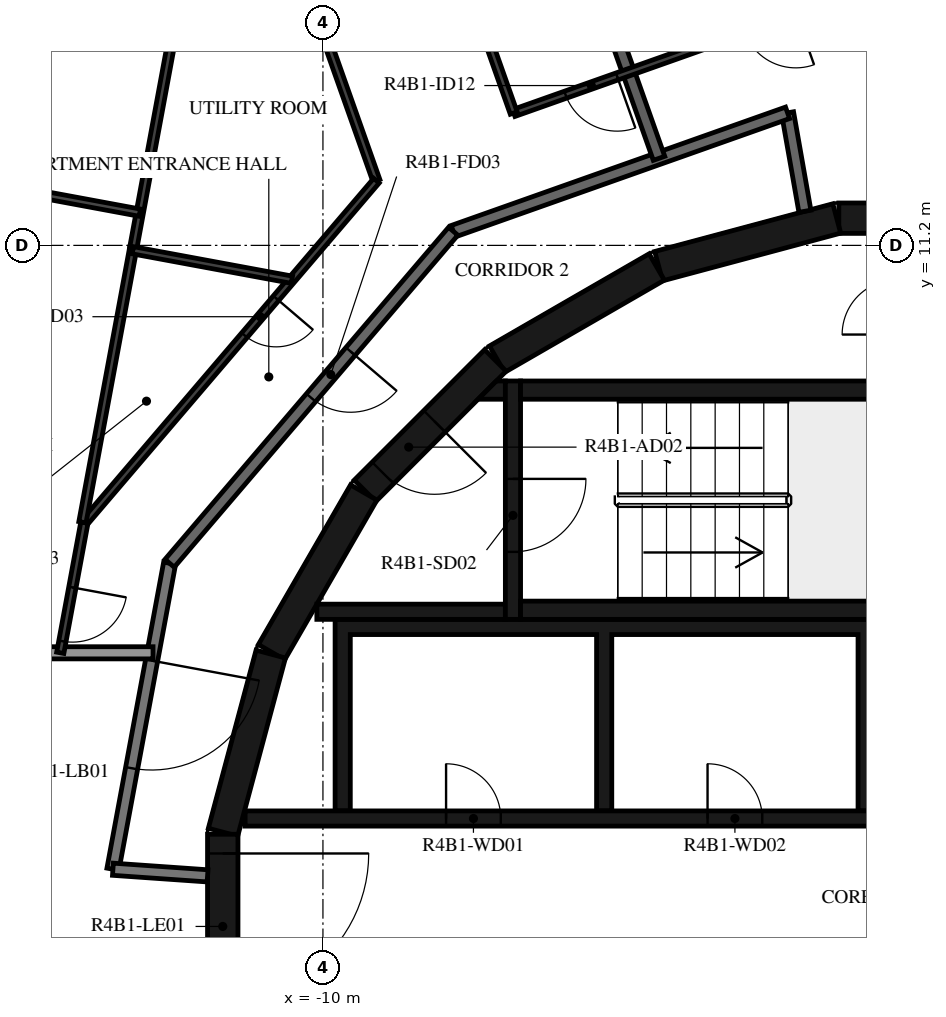
"""IFC4 building model, lengths in metres.
Left out: names, types, materials, properties, quantities, classifications, styles, units other than length and angle.
Written with IfcOpenShell. Run it as: python <this file> out.ifc"""

import sys

from ifc_helpers import new_model, si_unit, direction, frame, frame_2d, origin, place, context, subcontext, project, spatial, polyline, rectangle, outline, extrude, element, fill, save


model = new_model("IFC4")
c1 = context("Model", 3, precision=1e-05, world=origin(), true_north=direction((0.0, 1.0)))
c2 = subcontext(c1, "Body", "Model", "MODEL_VIEW")
j1 = project(units=[si_unit("LENGTHUNIT", "METRE"), si_unit("PLANEANGLEUNIT", "RADIAN")], contexts=[c1])
p1 = place(None, origin())
s1 = spatial("IfcSite", under=j1, at=p1, CompositionType="ELEMENT")
p2 = place(p1, origin())
s2 = spatial("IfcBuilding", under=s1, at=p2, CompositionType="ELEMENT")
p3 = place(p2, frame((0.0, 0.0, 162.2)))
s3 = spatial("IfcBuildingStorey", under=s2, at=p3, CompositionType="ELEMENT", Elevation=162.2)
for number, where, z_axis, x_axis in (
    (1, (1.516, 11.647, 0.0), (0.0, 0.0, 1.0), (-1.0, 0.0, 0.0)),
    (2, (-1.55, 11.643, 0.0), (0.0, 0.0, 1.0), (-0.966, -0.259, 0.0)),
    (3, (-4.51, 10.845, 0.0), (0.0, 0.0, 1.0), (-0.866, -0.5, 0.0)),
):
    element("IfcWall", number, at=place(p3, frame(where, z_axis=z_axis, x_axis=x_axis)), inside=s3, PredefinedType="SHEAR", context=c2, shape_type="SweptSolid", body=[
        extrude(rectangle(XDim=3.033, YDim=0.5, at=frame_2d((1.516, 0.0))), origin(), (0.0, 0.0, 1.0), 3.12),
    ])
p4 = place(p3, frame((-7.164, 9.308, 0.0), z_axis=(0.0, 0.0, 1.0), x_axis=(-0.707106781187, -0.707106781187, 0.0)))
e4 = element("IfcWall", 4, at=p4, inside=s3, PredefinedType="SHEAR", context=c2, shape_type="SweptSolid", body=[
    extrude(rectangle(XDim=3.032, YDim=0.5, at=frame_2d((1.516, 0.0))), origin(), (0.0, 0.0, 1.0), 3.12),
])
p5 = place(p4, frame((1.416, 0.0, 0.0)))
e5 = element("IfcOpeningElement", 5, at=p5, cuts=e4, PredefinedType="OPENING", context=c2, shape_type="SweptSolid", body=[
    extrude(rectangle(XDim=1.2, YDim=2.1, at=frame_2d((0.6, 1.05))), frame((0.0, 0.26, 0.0), z_axis=(0.0, -1.0, 0.0), x_axis=(1.0, 0.0, 0.0)), (0.0, 0.0, 1.0), 0.52),
])
for number, where, z_axis, x_axis in (
    (6, (-9.329, 7.137, 0.0), (0.0, 0.0, 1.0), (-0.5, -0.866, 0.0)),
    (7, (-10.858, 4.479, 0.0), (0.0, 0.0, 1.0), (-0.259, -0.966, 0.0)),
):
    element("IfcWall", number, at=place(p3, frame(where, z_axis=z_axis, x_axis=x_axis)), inside=s3, PredefinedType="SHEAR", context=c2, shape_type="SweptSolid", body=[
        extrude(rectangle(XDim=3.033, YDim=0.5, at=frame_2d((1.516, 0.0))), origin(), (0.0, 0.0, 1.0), 3.12),
    ])
p6 = place(p3, frame((-11.647, 1.516, 0.0), z_axis=(0.0, 0.0, 1.0), x_axis=(0.0, -1.0, 0.0)))
e8 = element("IfcWall", 8, at=p6, inside=s3, PredefinedType="SHEAR", context=c2, shape_type="SweptSolid", body=[
    extrude(rectangle(XDim=3.033, YDim=0.5, at=frame_2d((1.516, 0.0))), origin(), (0.0, 0.0, 1.0), 3.12),
])
p7 = place(p6, frame((0.316, 0.0, 0.0)))
e9 = element("IfcOpeningElement", 9, at=p7, cuts=e8, PredefinedType="OPENING", context=c2, shape_type="SweptSolid", body=[
    extrude(rectangle(XDim=2.4, YDim=2.1, at=frame_2d((1.2, 1.05))), frame((0.0, 0.26, 0.0), z_axis=(0.0, -1.0, 0.0), x_axis=(1.0, 0.0, 0.0)), (0.0, 0.0, 1.0), 0.52),
])
for number, where, z_axis, x_axis in (
    (10, (-6.75, 5.2, 0.0), (0.0, 0.0, 1.0), (1.0, 0.0, 0.0)),
    (11, (-6.75, 8.82, 0.0), (0.0, 0.0, 1.0), (1.0, 0.0, 0.0)),
):
    element("IfcWall", number, at=place(p3, frame(where, z_axis=z_axis, x_axis=x_axis)), inside=s3, PredefinedType="SHEAR", context=c2, shape_type="SweptSolid", body=[
        extrude(rectangle(XDim=6.75, YDim=0.3, at=frame_2d((3.375, 0.0))), origin(), (0.0, 0.0, 1.0), 3.12),
    ])
p8 = place(p3, frame((-6.875, 8.97, 0.0), z_axis=(0.0, 0.0, 1.0), x_axis=(0.0, -1.0, 0.0)))
e12 = element("IfcWall", 12, at=p8, inside=s3, PredefinedType="SHEAR", context=c2, shape_type="SweptSolid", body=[
    extrude(rectangle(XDim=3.92, YDim=0.25, at=frame_2d((1.96, 0.0))), origin(), (0.0, 0.0, 1.0), 3.12),
])
p9 = place(p8, frame((1.61, 0.0, 0.0)))
e13 = element("IfcOpeningElement", 13, at=p9, cuts=e12, PredefinedType="OPENING", context=c2, shape_type="SweptSolid", body=[
    extrude(rectangle(XDim=1.2, YDim=2.1, at=frame_2d((0.6, 1.05))), frame((0.0, 0.135, 0.0), z_axis=(0.0, -1.0, 0.0), x_axis=(1.0, 0.0, 0.0)), (0.0, 0.0, 1.0), 0.27),
])
p10 = place(p3, frame((-7.0, 5.175, 0.0), z_axis=(0.0, 0.0, 1.0), x_axis=(-1.0, 0.0, 0.0)))
e14 = element("IfcWall", 14, at=p10, inside=s3, PredefinedType="SHEAR", context=c2, shape_type="SweptSolid", body=[
    extrude(rectangle(XDim=3.1, YDim=0.25, at=frame_2d((1.55, 0.0))), origin(), (0.0, 0.0, 1.0), 3.12),
])
p11 = place(p3, origin())
e15 = element("IfcWall", 15, at=p11, inside=s3, PredefinedType="SHEAR", context=c2, shape_type="SweptSolid", body=[
    extrude(outline(polyline([(-7.148, 8.97), (-7.0, 8.97), (-7.0, 8.67), (-7.448, 8.67), (-7.148, 8.97)])), origin(), (0.0, 0.0, 1.0), 3.12),
])
p12 = place(p3, origin())
e16 = element("IfcWall", 16, at=p12, inside=s3, PredefinedType="SHEAR", context=c2, shape_type="SweptSolid", body=[
    extrude(outline(polyline([(-9.55, 4.8), (-5.5, 4.8), (-5.5, 1.9), (-5.25, 1.9), (-5.25, 4.8), (-1.2, 4.8), (-1.2, 1.9), (-0.95, 1.9), (-0.95, 4.8), (0.95, 4.8), (0.95, 1.9), (1.2, 1.9), (1.2, 4.8), (3.1, 4.8), (3.1, 1.9), (3.35, 1.9), (3.35, 4.8), (5.25, 4.8), (5.25, 1.9), (5.5, 1.9), (5.5, 4.8), (7.4, 4.8), (7.4, 1.9), (7.65, 1.9), (7.65, 4.8), (9.55, 4.8), (9.55, 1.9), (9.8, 1.9), (9.8, 4.8), (9.8, 5.05), (-9.8, 5.05), (-9.8, 4.8), (-9.8, 1.9), (-9.55, 1.9), (-9.55, 4.8)])), origin(), (0.0, 0.0, 1.0), 3.12),
])
p13 = place(p3, frame((-11.28, 1.775, 0.0), z_axis=(0.0, 0.0, 1.0), x_axis=(1.0, 0.0, 0.0)))
e17 = element("IfcWall", 17, at=p13, inside=s3, PredefinedType="SHEAR", context=c2, shape_type="SweptSolid", body=[
    extrude(rectangle(XDim=14.38, YDim=0.25, at=frame_2d((7.19, 0.0))), origin(), (0.0, 0.0, 1.0), 3.12),
])
p14 = place(p13, frame((10.73, 0.0, 0.0)))
e18 = element("IfcOpeningElement", 18, at=p14, cuts=e17, PredefinedType="OPENING", context=c2, shape_type="SweptSolid", body=[
    extrude(rectangle(XDim=1.1, YDim=2.1, at=frame_2d((0.55, 1.05))), frame((0.0, 0.135, 0.0), z_axis=(0.0, -1.0, 0.0), x_axis=(1.0, 0.0, 0.0)), (0.0, 0.0, 1.0), 0.27),
])
p15 = place(p13, frame((12.88, 0.0, 0.0)))
e19 = element("IfcOpeningElement", 19, at=p15, cuts=e17, PredefinedType="OPENING", context=c2, shape_type="SweptSolid", body=[
    extrude(rectangle(XDim=1.1, YDim=2.1, at=frame_2d((0.55, 1.05))), frame((0.0, 0.135, 0.0), z_axis=(0.0, -1.0, 0.0), x_axis=(1.0, 0.0, 0.0)), (0.0, 0.0, 1.0), 0.27),
])
p16 = place(p13, frame((3.305, 0.0, 0.0)))
e20 = element("IfcOpeningElement", 20, at=p16, cuts=e17, PredefinedType="OPENING", context=c2, shape_type="SweptSolid", body=[
    extrude(rectangle(XDim=0.9, YDim=2.1, at=frame_2d((0.45, 1.05))), frame((0.0, 0.135, 0.0), z_axis=(0.0, -1.0, 0.0), x_axis=(1.0, 0.0, 0.0)), (0.0, 0.0, 1.0), 0.27),
])
p17 = place(p13, frame((7.605, 0.0, 0.0)))
e21 = element("IfcOpeningElement", 21, at=p17, cuts=e17, PredefinedType="OPENING", context=c2, shape_type="SweptSolid", body=[
    extrude(rectangle(XDim=0.9, YDim=2.1, at=frame_2d((0.45, 1.05))), frame((0.0, 0.135, 0.0), z_axis=(0.0, -1.0, 0.0), x_axis=(1.0, 0.0, 0.0)), (0.0, 0.0, 1.0), 0.27),
])
p18 = place(p3, frame((-12.521, 5.972, 0.0), z_axis=(0.0, 0.0, 1.0), x_axis=(-0.182251559718, -0.983251935661, 0.0)))
e22 = element("IfcWall", 22, at=p18, inside=s3, PredefinedType="STANDARD", context=c2, shape_type="SweptSolid", body=[
    extrude(rectangle(XDim=5.117, YDim=0.2, at=frame_2d((2.559, 0.0))), origin(), (0.0, 0.0, 1.0), 3.12),
])
p19 = place(p18, frame((1.627, 0.0, 0.0)))
e23 = element("IfcOpeningElement", 23, at=p19, cuts=e22, PredefinedType="OPENING", context=c2, shape_type="SweptSolid", body=[
    extrude(rectangle(XDim=1.8, YDim=2.1, at=frame_2d((0.9, 1.05))), frame((0.0, 0.11, 0.0), z_axis=(0.0, -1.0, 0.0), x_axis=(1.0, 0.0, 0.0)), (0.0, 0.0, 1.0), 0.22),
])
p20 = place(p3, frame((-13.454, 0.941, 0.0), z_axis=(0.0, 0.0, 1.0), x_axis=(0.99755155062, -0.069934997354, 0.0)))
e24 = element("IfcWall", 24, at=p20, inside=s3, PredefinedType="STANDARD", context=c2, shape_type="SweptSolid", body=[
    extrude(rectangle(XDim=1.561, YDim=0.2, at=frame_2d((0.78, 0.0))), origin(), (0.0, 0.0, 1.0), 3.12),
])
p21 = place(p3, frame((-2.074, 11.761, 0.0), z_axis=(0.0, 0.0, 1.0), x_axis=(-0.1736412798, 0.984808969267, 0.0)))
e25 = element("IfcWall", 25, at=p21, inside=s3, PredefinedType="STANDARD", context=c2, shape_type="SweptSolid", body=[
    extrude(rectangle(XDim=1.644, YDim=0.2, at=frame_2d((0.822, 0.0))), origin(), (0.0, 0.0, 1.0), 3.12),
])
p22 = place(p3, frame((-2.359, 13.38, 0.0), z_axis=(0.0, 0.0, 1.0), x_axis=(-0.942647529236, -0.333789807551, 0.0)))
e26 = element("IfcWall", 26, at=p22, inside=s3, PredefinedType="STANDARD", context=c2, shape_type="SweptSolid", body=[
    extrude(rectangle(XDim=5.833, YDim=0.2, at=frame_2d((2.917, 0.0))), origin(), (0.0, 0.0, 1.0), 3.12),
])
p23 = place(p3, frame((-7.858, 11.433, 0.0), z_axis=(0.0, 0.0, 1.0), x_axis=(-0.649440801937, -0.760412154545, 0.0)))
e27 = element("IfcWall", 27, at=p23, inside=s3, PredefinedType="STANDARD", context=c2, shape_type="SweptSolid", body=[
    extrude(rectangle(XDim=7.181, YDim=0.2, at=frame_2d((3.59, 0.0))), origin(), (0.0, 0.0, 1.0), 3.12),
])
p24 = place(p23, frame((2.6, 0.0, 0.0)))
e28 = element("IfcOpeningElement", 28, at=p24, cuts=e27, PredefinedType="OPENING", context=c2, shape_type="SweptSolid", body=[
    extrude(rectangle(XDim=1.0, YDim=2.1, at=frame_2d((0.5, 1.05))), frame((0.0, 0.11, 0.0), z_axis=(0.0, -1.0, 0.0), x_axis=(1.0, 0.0, 0.0)), (0.0, 0.0, 1.0), 0.22),
])
p25 = place(p3, frame((-12.794, 4.5, 0.0), z_axis=(0.0, 0.0, 1.0), x_axis=(-1.0, 0.0, 0.0)))
e29 = element("IfcWall", 29, at=p25, inside=s3, PredefinedType="STANDARD", context=c2, shape_type="SweptSolid", body=[
    extrude(rectangle(XDim=5.106, YDim=0.2, at=frame_2d((2.553, 0.0))), origin(), (0.0, 0.0, 1.0), 2.73),
])
p26 = place(p3, frame((-5.887, 16.626, 0.0), z_axis=(0.0, 0.0, 1.0), x_axis=(0.333820478853, -0.942636668021, 0.0)))
e30 = element("IfcWall", 30, at=p26, inside=s3, PredefinedType="STANDARD", context=c2, shape_type="SweptSolid", body=[
    extrude(rectangle(XDim=4.238, YDim=0.2, at=frame_2d((2.119, 0.0))), origin(), (0.0, 0.0, 1.0), 3.12),
])
p27 = place(p3, frame((6.081, 14.027, 0.0), z_axis=(0.0, 0.0, 1.0), x_axis=(-0.983250989832, 0.182256662416, 0.0)))
e31 = element("IfcWall", 31, at=p27, inside=s3, PredefinedType="PARTITIONING", context=c2, shape_type="SweptSolid", body=[
    extrude(rectangle(XDim=7.416, YDim=0.12, at=frame_2d((3.708, 0.0))), origin(), (0.0, 0.0, 1.0), 3.12),
])
p28 = place(p27, frame((0.2, 0.0, 0.0)))
e32 = element("IfcOpeningElement", 32, at=p28, cuts=e31, PredefinedType="OPENING", context=c2, shape_type="SweptSolid", body=[
    extrude(rectangle(XDim=0.9, YDim=2.1, at=frame_2d((0.45, 1.05))), frame((0.0, 0.07, 0.0), z_axis=(0.0, -1.0, 0.0), x_axis=(1.0, 0.0, 0.0)), (0.0, 0.0, 1.0), 0.14),
])
p29 = place(p27, frame((4.065, 0.0, 0.0)))
e33 = element("IfcOpeningElement", 33, at=p29, cuts=e31, PredefinedType="OPENING", context=c2, shape_type="SweptSolid", body=[
    extrude(rectangle(XDim=0.8, YDim=2.1, at=frame_2d((0.4, 1.05))), frame((0.0, 0.07, 0.0), z_axis=(0.0, -1.0, 0.0), x_axis=(1.0, 0.0, 0.0)), (0.0, 0.0, 1.0), 0.14),
])
p30 = place(p3, frame((-1.21, 15.378, 0.0), z_axis=(0.0, 0.0, 1.0), x_axis=(-0.9426440416, -0.333799656734, 0.0)))
e34 = element("IfcWall", 34, at=p30, inside=s3, PredefinedType="PARTITIONING", context=c2, shape_type="SweptSolid", body=[
    extrude(rectangle(XDim=5.996, YDim=0.12, at=frame_2d((2.998, 0.0))), origin(), (0.0, 0.0, 1.0), 3.12),
])
p31 = place(p30, frame((1.075, 0.0, 0.0)))
e35 = element("IfcOpeningElement", 35, at=p31, cuts=e34, PredefinedType="OPENING", context=c2, shape_type="SweptSolid", body=[
    extrude(rectangle(XDim=0.9, YDim=2.1, at=frame_2d((0.45, 1.05))), frame((0.0, 0.07, 0.0), z_axis=(0.0, -1.0, 0.0), x_axis=(1.0, 0.0, 0.0)), (0.0, 0.0, 1.0), 0.14),
])
p32 = place(p30, frame((4.192, 0.0, 0.0)))
e36 = element("IfcOpeningElement", 36, at=p32, cuts=e34, PredefinedType="OPENING", context=c2, shape_type="SweptSolid", body=[
    extrude(rectangle(XDim=0.9, YDim=2.1, at=frame_2d((0.45, 1.05))), frame((0.0, 0.07, 0.0), z_axis=(0.0, -1.0, 0.0), x_axis=(1.0, 0.0, 0.0)), (0.0, 0.0, 1.0), 0.14),
])
p33 = place(p3, frame((-6.862, 13.377, 0.0), z_axis=(0.0, 0.0, 1.0), x_axis=(-0.333868827671, 0.942619544625, 0.0)))
e37 = element("IfcWall", 37, at=p33, inside=s3, PredefinedType="PARTITIONING", context=c2, shape_type="SweptSolid", body=[
    extrude(rectangle(XDim=3.543, YDim=0.12, at=frame_2d((1.771, 0.0))), origin(), (0.0, 0.0, 1.0), 3.12),
])
p34 = place(p3, frame((-10.402, 15.882, 0.0), z_axis=(0.0, 0.0, 1.0), x_axis=(0.33382476952, -0.942635148536, 0.0)))
e38 = element("IfcWall", 38, at=p34, inside=s3, PredefinedType="PARTITIONING", context=c2, shape_type="SweptSolid", body=[
    extrude(rectangle(XDim=3.838, YDim=0.12, at=frame_2d((1.919, 0.0))), origin(), (0.0, 0.0, 1.0), 3.12),
])
p35 = place(p3, frame((-9.12, 12.264, 0.0), z_axis=(0.0, 0.0, 1.0), x_axis=(-0.649444490942, -0.760409003882, 0.0)))
e39 = element("IfcWall", 39, at=p35, inside=s3, PredefinedType="PARTITIONING", context=c2, shape_type="SweptSolid", body=[
    extrude(rectangle(XDim=7.395, YDim=0.12, at=frame_2d((3.697, 0.0))), origin(), (0.0, 0.0, 1.0), 3.12),
])
p36 = place(p35, frame((2.542, 0.0, 0.0)))
e40 = element("IfcOpeningElement", 40, at=p36, cuts=e39, PredefinedType="OPENING", context=c2, shape_type="SweptSolid", body=[
    extrude(rectangle(XDim=0.8, YDim=2.1, at=frame_2d((0.4, 1.05))), frame((0.0, 0.07, 0.0), z_axis=(0.0, -1.0, 0.0), x_axis=(1.0, 0.0, 0.0)), (0.0, 0.0, 1.0), 0.14),
])
p37 = place(p3, frame((-13.923, 6.641, 0.0), z_axis=(0.0, 0.0, 1.0), x_axis=(-0.182209715759, -0.983259690765, 0.0)))
e41 = element("IfcWall", 41, at=p37, inside=s3, PredefinedType="PARTITIONING", context=c2, shape_type="SweptSolid", body=[
    extrude(rectangle(XDim=2.177, YDim=0.12, at=frame_2d((1.089, 0.0))), origin(), (0.0, 0.0, 1.0), 3.12),
])
p38 = place(p37, frame((1.083, 0.0, 0.0)))
e42 = element("IfcOpeningElement", 42, at=p38, cuts=e41, PredefinedType="OPENING", context=c2, shape_type="SweptSolid", body=[
    extrude(rectangle(XDim=0.9, YDim=2.1, at=frame_2d((0.45, 1.05))), frame((0.0, 0.07, 0.0), z_axis=(0.0, -1.0, 0.0), x_axis=(1.0, 0.0, 0.0)), (0.0, 0.0, 1.0), 0.14),
])
p39 = place(p3, frame((-13.955, 6.647, 0.0), z_axis=(0.0, 0.0, 1.0), x_axis=(0.182264522222, 0.983249532896, 0.0)))
e43 = element("IfcWall", 43, at=p39, inside=s3, PredefinedType="PARTITIONING", context=c2, shape_type="SweptSolid", body=[
    extrude(rectangle(XDim=4.589, YDim=0.12, at=frame_2d((2.294, 0.0))), origin(), (0.0, 0.0, 1.0), 3.12),
])
p40 = place(p3, frame((-11.396, 20.453, 0.0), z_axis=(0.0, 0.0, 1.0), x_axis=(-0.182223370439, -0.983257160292, 0.0)))
e44 = element("IfcWall", 44, at=p40, inside=s3, PredefinedType="PARTITIONING", context=c2, shape_type="SweptSolid", body=[
    extrude(rectangle(XDim=9.452, YDim=0.12, at=frame_2d((4.726, 0.0))), origin(), (0.0, 0.0, 1.0), 3.12),
])
p41 = place(p40, frame((3.406, 0.0, 0.0)))
e45 = element("IfcOpeningElement", 45, at=p41, cuts=e44, PredefinedType="OPENING", context=c2, shape_type="SweptSolid", body=[
    extrude(rectangle(XDim=0.9, YDim=2.1, at=frame_2d((0.45, 1.05))), frame((0.0, 0.07, 0.0), z_axis=(0.0, -1.0, 0.0), x_axis=(1.0, 0.0, 0.0)), (0.0, 0.0, 1.0), 0.14),
])
p42 = place(p40, frame((0.2, 0.0, 0.0)))
e46 = element("IfcOpeningElement", 46, at=p42, cuts=e44, PredefinedType="OPENING", context=c2, shape_type="SweptSolid", body=[
    extrude(rectangle(XDim=0.9, YDim=2.1, at=frame_2d((0.45, 1.05))), frame((0.0, 0.07, 0.0), z_axis=(0.0, -1.0, 0.0), x_axis=(1.0, 0.0, 0.0)), (0.0, 0.0, 1.0), 0.14),
])
p43 = place(p3, frame((-13.126, 11.12, 0.0), z_axis=(0.0, 0.0, 1.0), x_axis=(0.983257646361, -0.182220747645, 0.0)))
e47 = element("IfcWall", 47, at=p43, inside=s3, PredefinedType="PARTITIONING", context=c2, shape_type="SweptSolid", body=[
    extrude(rectangle(XDim=2.659, YDim=0.12, at=frame_2d((1.33, 0.0))), origin(), (0.0, 0.0, 1.0), 3.12),
])
p44 = place(p3, frame((-16.552, 12.394, 0.0), z_axis=(0.0, 0.0, 1.0), x_axis=(0.983257712156, -0.182220392618, 0.0)))
e48 = element("IfcWall", 48, at=p44, inside=s3, PredefinedType="PARTITIONING", context=c2, shape_type="SweptSolid", body=[
    extrude(rectangle(XDim=3.6, YDim=0.12, at=frame_2d((1.8, 0.0))), origin(), (0.0, 0.0, 1.0), 2.73),
])
p45 = place(p9, origin())
e49 = element("IfcDoor", 49, at=p45, inside=s3, OperationType="SINGLE_SWING_LEFT", PredefinedType="DOOR", context=c2, shape_type="SweptSolid", body=[
    extrude(rectangle(XDim=1.2, YDim=2.1, at=frame_2d((0.6, 1.05))), frame((0.0, 0.025, 0.0), z_axis=(0.0, -1.0, 0.0), x_axis=(1.0, 0.0, 0.0)), (0.0, 0.0, 1.0), 0.05),
])
fill(e13, e49)
p46 = place(p5, origin())
e50 = element("IfcDoor", 50, at=p46, inside=s3, OperationType="SINGLE_SWING_RIGHT", PredefinedType="DOOR", context=c2, shape_type="SweptSolid", body=[
    extrude(rectangle(XDim=1.2, YDim=2.1, at=frame_2d((0.6, 1.05))), frame((0.0, 0.025, 0.0), z_axis=(0.0, -1.0, 0.0), x_axis=(1.0, 0.0, 0.0)), (0.0, 0.0, 1.0), 0.05),
])
fill(e5, e50)
p47 = place(p7, origin())
e51 = element("IfcDoor", 51, at=p47, inside=s3, OperationType="DOUBLE_DOOR_SINGLE_SWING", PredefinedType="DOOR", context=c2, shape_type="SweptSolid", body=[
    extrude(rectangle(XDim=2.4, YDim=2.1, at=frame_2d((1.2, 1.05))), frame((0.0, 0.025, 0.0), z_axis=(0.0, -1.0, 0.0), x_axis=(1.0, 0.0, 0.0)), (0.0, 0.0, 1.0), 0.05),
])
fill(e9, e51)
p48 = place(p16, origin())
e52 = element("IfcDoor", 52, at=p48, inside=s3, OperationType="SINGLE_SWING_LEFT", PredefinedType="DOOR", context=c2, shape_type="SweptSolid", body=[
    extrude(rectangle(XDim=0.9, YDim=2.1, at=frame_2d((0.45, 1.05))), frame((0.0, 0.025, 0.0), z_axis=(0.0, -1.0, 0.0), x_axis=(1.0, 0.0, 0.0)), (0.0, 0.0, 1.0), 0.05),
])
fill(e20, e52)
p49 = place(p17, origin())
e53 = element("IfcDoor", 53, at=p49, inside=s3, OperationType="SINGLE_SWING_RIGHT", PredefinedType="DOOR", context=c2, shape_type="SweptSolid", body=[
    extrude(rectangle(XDim=0.9, YDim=2.1, at=frame_2d((0.45, 1.05))), frame((0.0, 0.025, 0.0), z_axis=(0.0, -1.0, 0.0), x_axis=(1.0, 0.0, 0.0)), (0.0, 0.0, 1.0), 0.05),
])
fill(e21, e53)
p50 = place(p24, origin())
e54 = element("IfcDoor", 54, at=p50, inside=s3, OperationType="SINGLE_SWING_LEFT", PredefinedType="DOOR", context=c2, shape_type="SweptSolid", body=[
    extrude(rectangle(XDim=1.0, YDim=2.1, at=frame_2d((0.5, 1.05))), frame((0.0, 0.025, 0.0), z_axis=(0.0, -1.0, 0.0), x_axis=(1.0, 0.0, 0.0)), (0.0, 0.0, 1.0), 0.05),
])
fill(e28, e54)
p51 = place(p32, origin())
e55 = element("IfcDoor", 55, at=p51, inside=s3, OperationType="SINGLE_SWING_LEFT", PredefinedType="DOOR", context=c2, shape_type="SweptSolid", body=[
    extrude(rectangle(XDim=0.9, YDim=2.1, at=frame_2d((0.45, 1.05))), frame((0.0, 0.025, 0.0), z_axis=(0.0, -1.0, 0.0), x_axis=(1.0, 0.0, 0.0)), (0.0, 0.0, 1.0), 0.05),
])
fill(e36, e55)
p52 = place(p36, origin())
e56 = element("IfcDoor", 56, at=p52, inside=s3, OperationType="SINGLE_SWING_LEFT", PredefinedType="DOOR", context=c2, shape_type="SweptSolid", body=[
    extrude(rectangle(XDim=0.8, YDim=2.1, at=frame_2d((0.4, 1.05))), frame((0.0, 0.025, 0.0), z_axis=(0.0, -1.0, 0.0), x_axis=(1.0, 0.0, 0.0)), (0.0, 0.0, 1.0), 0.05),
])
fill(e40, e56)
p53 = place(p38, origin())
e57 = element("IfcDoor", 57, at=p53, inside=s3, OperationType="SINGLE_SWING_LEFT", PredefinedType="DOOR", context=c2, shape_type="SweptSolid", body=[
    extrude(rectangle(XDim=0.9, YDim=2.1, at=frame_2d((0.45, 1.05))), frame((0.0, 0.025, 0.0), z_axis=(0.0, -1.0, 0.0), x_axis=(1.0, 0.0, 0.0)), (0.0, 0.0, 1.0), 0.05),
])
fill(e42, e57)
p54 = place(p19, origin())
e58 = element("IfcDoor", 58, at=p54, inside=s3, OperationType="DOUBLE_DOOR_SINGLE_SWING", PredefinedType="DOOR", context=c2, shape_type="SweptSolid", body=[
    extrude(rectangle(XDim=1.8, YDim=2.1, at=frame_2d((0.9, 1.05))), frame((0.0, 0.025, 0.0), z_axis=(0.0, -1.0, 0.0), x_axis=(1.0, 0.0, 0.0)), (0.0, 0.0, 1.0), 0.05),
])
fill(e23, e58)
save(model, sys.argv[1])
